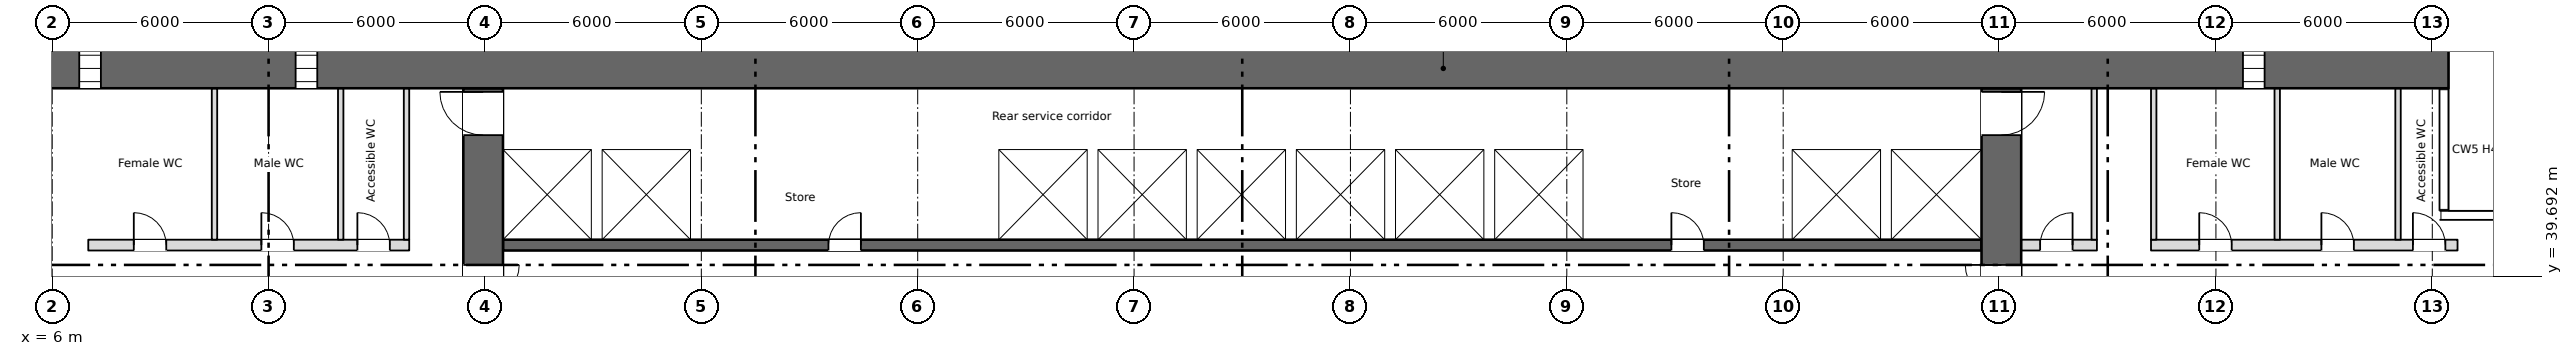
"""IFC4 building model, lengths in metres.
Left out: names, types, materials, properties, quantities, classifications, styles, units other than length and angle.
Written with IfcOpenShell. Run it as: python <this file> out.ifc"""

import sys

from ifc_helpers import new_model, si_unit, direction, frame, frame_2d, origin, place, context, subcontext, project, spatial, rectangle, extrude, element, fill, save


model = new_model("IFC4")
c1 = context("Model", 3, precision=1e-05, world=origin(), true_north=direction((0.0, 1.0)))
c2 = subcontext(c1, "Body", "Model", "MODEL_VIEW")
j1 = project(units=[si_unit("LENGTHUNIT", "METRE"), si_unit("PLANEANGLEUNIT", "RADIAN")], contexts=[c1])
p1 = place(None, origin())
s1 = spatial("IfcSite", under=j1, at=p1, CompositionType="ELEMENT")
p2 = place(p1, origin())
s2 = spatial("IfcBuilding", under=s1, at=p2, CompositionType="ELEMENT")
p3 = place(p2, frame((0.0, 0.0, 6.5)))
s3 = spatial("IfcBuildingStorey", under=s2, at=p3, CompositionType="ELEMENT", Elevation=6.5)
p4 = place(p3, frame((5.55, 45.45, 0.0), z_axis=(0.0, 0.0, 1.0), x_axis=(1.0, 0.0, 0.0)))
e1 = element("IfcWall", 1, at=p4, inside=s3, PredefinedType="SHEAR", context=c2, shape_type="SweptSolid", body=[
    extrude(rectangle(XDim=66.9, YDim=1.1, at=frame_2d((33.45, 0.0))), origin(), (0.0, 0.0, 1.0), 4.3),
])
p5 = place(p4, frame((1.2, 0.0, 0.6)))
e2 = element("IfcOpeningElement", 2, at=p5, cuts=e1, PredefinedType="OPENING", context=c2, shape_type="SweptSolid", body=[
    extrude(rectangle(XDim=0.6, YDim=2.7, at=frame_2d((0.3, 1.35))), frame((0.0, 0.56, 0.0), z_axis=(0.0, -1.0, 0.0), x_axis=(1.0, 0.0, 0.0)), (0.0, 0.0, 1.0), 1.12),
])
p6 = place(p4, frame((7.2, 0.0, 0.6)))
e3 = element("IfcOpeningElement", 3, at=p6, cuts=e1, PredefinedType="OPENING", context=c2, shape_type="SweptSolid", body=[
    extrude(rectangle(XDim=0.6, YDim=2.7, at=frame_2d((0.3, 1.35))), frame((0.0, 0.56, 0.0), z_axis=(0.0, -1.0, 0.0), x_axis=(1.0, 0.0, 0.0)), (0.0, 0.0, 1.0), 1.12),
])
p7 = place(p4, frame((61.2, 0.0, 0.6)))
e4 = element("IfcOpeningElement", 4, at=p7, cuts=e1, PredefinedType="OPENING", context=c2, shape_type="SweptSolid", body=[
    extrude(rectangle(XDim=0.6, YDim=2.7, at=frame_2d((0.3, 1.35))), frame((0.0, 0.56, 0.0), z_axis=(0.0, -1.0, 0.0), x_axis=(1.0, 0.0, 0.0)), (0.0, 0.0, 1.0), 1.12),
])
p8 = place(p3, frame((6.85, 28.4, 0.0), z_axis=(0.0, 0.0, 1.0), x_axis=(0.0, 1.0, 0.0)))
e5 = element("IfcWall", 5, at=p8, inside=s3, PredefinedType="SHEAR", context=c2, shape_type="SweptSolid", body=[
    extrude(rectangle(XDim=16.5, YDim=0.3, at=frame_2d((8.25, 0.0))), origin(), (0.0, 0.0, 1.0), 4.3),
])
p9 = place(p3, frame((72.85, 28.4, 0.0), z_axis=(0.0, 0.0, 1.0), x_axis=(0.0, 1.0, 0.0)))
e6 = element("IfcWall", 6, at=p9, inside=s3, PredefinedType="SHEAR", context=c2, shape_type="SweptSolid", body=[
    extrude(rectangle(XDim=12.85, YDim=0.3, at=frame_2d((6.425, 0.0))), origin(), (0.0, 0.0, 1.0), 4.3),
])
p10 = place(p3, frame((17.95, 28.4, 0.0), z_axis=(0.0, 0.0, 1.0), x_axis=(0.0, 1.0, 0.0)))
e7 = element("IfcWall", 7, at=p10, inside=s3, PredefinedType="SHEAR", context=c2, shape_type="SweptSolid", body=[
    extrude(rectangle(XDim=16.5, YDim=1.1, at=frame_2d((8.25, 0.0))), origin(), (0.0, 0.0, 1.0), 4.3),
])
p11 = place(p10, frame((9.6, 0.0, 0.0)))
e8 = element("IfcOpeningElement", 8, at=p11, cuts=e7, PredefinedType="OPENING", context=c2, shape_type="SweptSolid", body=[
    extrude(rectangle(XDim=2.0, YDim=2.1, at=frame_2d((1.0, 1.05))), frame((0.0, 0.56, 0.0), z_axis=(0.0, -1.0, 0.0), x_axis=(1.0, 0.0, 0.0)), (0.0, 0.0, 1.0), 1.12),
])
p12 = place(p10, frame((15.2, 0.0, 0.0)))
e9 = element("IfcOpeningElement", 9, at=p12, cuts=e7, PredefinedType="OPENING", context=c2, shape_type="SweptSolid", body=[
    extrude(rectangle(XDim=1.2, YDim=2.1, at=frame_2d((0.6, 1.05))), frame((0.0, 0.56, 0.0), z_axis=(0.0, -1.0, 0.0), x_axis=(1.0, 0.0, 0.0)), (0.0, 0.0, 1.0), 1.12),
])
p13 = place(p3, frame((60.05, 28.4, 0.0), z_axis=(0.0, 0.0, 1.0), x_axis=(0.0, 1.0, 0.0)))
e10 = element("IfcWall", 10, at=p13, inside=s3, PredefinedType="SHEAR", context=c2, shape_type="SweptSolid", body=[
    extrude(rectangle(XDim=16.5, YDim=1.1, at=frame_2d((8.25, 0.0))), origin(), (0.0, 0.0, 1.0), 4.3),
])
p14 = place(p13, frame((9.6, 0.0, 0.0)))
e11 = element("IfcOpeningElement", 11, at=p14, cuts=e10, PredefinedType="OPENING", context=c2, shape_type="SweptSolid", body=[
    extrude(rectangle(XDim=2.0, YDim=2.1, at=frame_2d((1.0, 1.05))), frame((0.0, 0.56, 0.0), z_axis=(0.0, -1.0, 0.0), x_axis=(1.0, 0.0, 0.0)), (0.0, 0.0, 1.0), 1.12),
])
p15 = place(p13, frame((15.2, 0.0, 0.0)))
e12 = element("IfcOpeningElement", 12, at=p15, cuts=e10, PredefinedType="OPENING", context=c2, shape_type="SweptSolid", body=[
    extrude(rectangle(XDim=1.2, YDim=2.1, at=frame_2d((0.6, 1.05))), frame((0.0, 0.56, 0.0), z_axis=(0.0, -1.0, 0.0), x_axis=(1.0, 0.0, 0.0)), (0.0, 0.0, 1.0), 1.12),
])
p16 = place(p3, frame((18.5, 40.55, 0.0), z_axis=(0.0, 0.0, 1.0), x_axis=(1.0, 0.0, 0.0)))
e13 = element("IfcWall", 13, at=p16, inside=s3, PredefinedType="SHEAR", context=c2, shape_type="SweptSolid", body=[
    extrude(rectangle(XDim=41.0, YDim=0.3, at=frame_2d((20.5, 0.0))), origin(), (0.0, 0.0, 1.0), 4.3),
])
p17 = place(p16, frame((9.025, 0.0, 0.0)))
e14 = element("IfcOpeningElement", 14, at=p17, cuts=e13, PredefinedType="OPENING", context=c2, shape_type="SweptSolid", body=[
    extrude(rectangle(XDim=0.9, YDim=2.1, at=frame_2d((0.45, 1.05))), frame((0.0, 0.16, 0.0), z_axis=(0.0, -1.0, 0.0), x_axis=(1.0, 0.0, 0.0)), (0.0, 0.0, 1.0), 0.32),
])
p18 = place(p16, frame((32.4, 0.0, 0.0)))
e15 = element("IfcOpeningElement", 15, at=p18, cuts=e13, PredefinedType="OPENING", context=c2, shape_type="SweptSolid", body=[
    extrude(rectangle(XDim=0.9, YDim=2.1, at=frame_2d((0.45, 1.05))), frame((0.0, 0.16, 0.0), z_axis=(0.0, -1.0, 0.0), x_axis=(1.0, 0.0, 0.0)), (0.0, 0.0, 1.0), 0.32),
])
p19 = place(p16, frame((14.425, 0.0, 0.0)))
e16 = element("IfcOpeningElement", 16, at=p19, cuts=e13, PredefinedType="OPENING", context=c2, shape_type="SweptSolid", body=[
    extrude(rectangle(XDim=1.1, YDim=2.1, at=frame_2d((0.55, 1.05))), frame((0.0, 0.16, 0.0), z_axis=(0.0, -1.0, 0.0), x_axis=(1.0, 0.0, 0.0)), (0.0, 0.0, 1.0), 0.32),
])
p20 = place(p16, frame((17.175, 0.0, 0.0)))
e17 = element("IfcOpeningElement", 17, at=p20, cuts=e13, PredefinedType="OPENING", context=c2, shape_type="SweptSolid", body=[
    extrude(rectangle(XDim=1.1, YDim=2.1, at=frame_2d((0.55, 1.05))), frame((0.0, 0.16, 0.0), z_axis=(0.0, -1.0, 0.0), x_axis=(1.0, 0.0, 0.0)), (0.0, 0.0, 1.0), 0.32),
])
p21 = place(p16, frame((19.925, 0.0, 0.0)))
e18 = element("IfcOpeningElement", 18, at=p21, cuts=e13, PredefinedType="OPENING", context=c2, shape_type="SweptSolid", body=[
    extrude(rectangle(XDim=1.1, YDim=2.1, at=frame_2d((0.55, 1.05))), frame((0.0, 0.16, 0.0), z_axis=(0.0, -1.0, 0.0), x_axis=(1.0, 0.0, 0.0)), (0.0, 0.0, 1.0), 0.32),
])
p22 = place(p16, frame((22.675, 0.0, 0.0)))
e19 = element("IfcOpeningElement", 19, at=p22, cuts=e13, PredefinedType="OPENING", context=c2, shape_type="SweptSolid", body=[
    extrude(rectangle(XDim=1.1, YDim=2.1, at=frame_2d((0.55, 1.05))), frame((0.0, 0.16, 0.0), z_axis=(0.0, -1.0, 0.0), x_axis=(1.0, 0.0, 0.0)), (0.0, 0.0, 1.0), 0.32),
])
p23 = place(p16, frame((36.375, 0.0, 0.0)))
e20 = element("IfcOpeningElement", 20, at=p23, cuts=e13, PredefinedType="OPENING", context=c2, shape_type="SweptSolid", body=[
    extrude(rectangle(XDim=1.2, YDim=2.1, at=frame_2d((0.6, 1.05))), frame((0.0, 0.16, 0.0), z_axis=(0.0, -1.0, 0.0), x_axis=(1.0, 0.0, 0.0)), (0.0, 0.0, 1.0), 0.32),
])
p24 = place(p16, frame((39.15, 0.0, 0.0)))
e21 = element("IfcOpeningElement", 21, at=p24, cuts=e13, PredefinedType="OPENING", context=c2, shape_type="SweptSolid", body=[
    extrude(rectangle(XDim=1.2, YDim=2.1, at=frame_2d((0.6, 1.05))), frame((0.0, 0.16, 0.0), z_axis=(0.0, -1.0, 0.0), x_axis=(1.0, 0.0, 0.0)), (0.0, 0.0, 1.0), 0.32),
])
p25 = place(p3, frame((18.5, 43.35, 0.0), z_axis=(0.0, 0.0, 1.0), x_axis=(1.0, 0.0, 0.0)))
e22 = element("IfcWall", 22, at=p25, inside=s3, PredefinedType="SHEAR", context=c2, shape_type="SweptSolid", body=[
    extrude(rectangle(XDim=41.0, YDim=0.3, at=frame_2d((20.5, 0.0))), origin(), (0.0, 0.0, 1.0), 4.3),
])
p26 = place(p3, frame((7.0, 40.55, 0.0), z_axis=(0.0, 0.0, 1.0), x_axis=(1.0, 0.0, 0.0)))
e23 = element("IfcWall", 23, at=p26, inside=s3, PredefinedType="PARTITIONING", context=c2, shape_type="SweptSolid", body=[
    extrude(rectangle(XDim=8.9, YDim=0.3, at=frame_2d((4.45, 0.0))), origin(), (0.0, 0.0, 1.0), 4.3),
])
p27 = place(p26, frame((1.262, 0.0, 0.0)))
e24 = element("IfcOpeningElement", 24, at=p27, cuts=e23, PredefinedType="OPENING", context=c2, shape_type="SweptSolid", body=[
    extrude(rectangle(XDim=0.9, YDim=2.1, at=frame_2d((0.45, 1.05))), frame((0.0, 0.16, 0.0), z_axis=(0.0, -1.0, 0.0), x_axis=(1.0, 0.0, 0.0)), (0.0, 0.0, 1.0), 0.32),
])
p28 = place(p26, frame((4.8, 0.0, 0.0)))
e25 = element("IfcOpeningElement", 25, at=p28, cuts=e23, PredefinedType="OPENING", context=c2, shape_type="SweptSolid", body=[
    extrude(rectangle(XDim=0.9, YDim=2.1, at=frame_2d((0.45, 1.05))), frame((0.0, 0.16, 0.0), z_axis=(0.0, -1.0, 0.0), x_axis=(1.0, 0.0, 0.0)), (0.0, 0.0, 1.0), 0.32),
])
p29 = place(p26, frame((7.462, 0.0, 0.0)))
e26 = element("IfcOpeningElement", 26, at=p29, cuts=e23, PredefinedType="OPENING", context=c2, shape_type="SweptSolid", body=[
    extrude(rectangle(XDim=0.9, YDim=2.1, at=frame_2d((0.45, 1.05))), frame((0.0, 0.16, 0.0), z_axis=(0.0, -1.0, 0.0), x_axis=(1.0, 0.0, 0.0)), (0.0, 0.0, 1.0), 0.32),
])
p30 = place(p3, frame((60.6, 40.55, 0.0), z_axis=(0.0, 0.0, 1.0), x_axis=(1.0, 0.0, 0.0)))
e27 = element("IfcWall", 27, at=p30, inside=s3, PredefinedType="PARTITIONING", context=c2, shape_type="SweptSolid", body=[
    extrude(rectangle(XDim=2.1, YDim=0.3, at=frame_2d((1.05, 0.0))), origin(), (0.0, 0.0, 1.0), 4.3),
])
p31 = place(p30, frame((0.525, 0.0, 0.0)))
e28 = element("IfcOpeningElement", 28, at=p31, cuts=e27, PredefinedType="OPENING", context=c2, shape_type="SweptSolid", body=[
    extrude(rectangle(XDim=0.9, YDim=2.1, at=frame_2d((0.45, 1.05))), frame((0.0, 0.16, 0.0), z_axis=(0.0, -1.0, 0.0), x_axis=(1.0, 0.0, 0.0)), (0.0, 0.0, 1.0), 0.32),
])
p32 = place(p3, frame((64.2, 40.55, 0.0), z_axis=(0.0, 0.0, 1.0), x_axis=(1.0, 0.0, 0.0)))
e29 = element("IfcWall", 29, at=p32, inside=s3, PredefinedType="PARTITIONING", context=c2, shape_type="SweptSolid", body=[
    extrude(rectangle(XDim=8.5, YDim=0.3, at=frame_2d((4.25, 0.0))), origin(), (0.0, 0.0, 1.0), 4.3),
])
p33 = place(p32, frame((1.337, 0.0, 0.0)))
e30 = element("IfcOpeningElement", 30, at=p33, cuts=e29, PredefinedType="OPENING", context=c2, shape_type="SweptSolid", body=[
    extrude(rectangle(XDim=0.9, YDim=2.1, at=frame_2d((0.45, 1.05))), frame((0.0, 0.16, 0.0), z_axis=(0.0, -1.0, 0.0), x_axis=(1.0, 0.0, 0.0)), (0.0, 0.0, 1.0), 0.32),
])
p34 = place(p32, frame((4.725, 0.0, 0.0)))
e31 = element("IfcOpeningElement", 31, at=p34, cuts=e29, PredefinedType="OPENING", context=c2, shape_type="SweptSolid", body=[
    extrude(rectangle(XDim=0.9, YDim=2.1, at=frame_2d((0.45, 1.05))), frame((0.0, 0.16, 0.0), z_axis=(0.0, -1.0, 0.0), x_axis=(1.0, 0.0, 0.0)), (0.0, 0.0, 1.0), 0.32),
])
p35 = place(p32, frame((7.262, 0.0, 0.0)))
e32 = element("IfcOpeningElement", 32, at=p35, cuts=e29, PredefinedType="OPENING", context=c2, shape_type="SweptSolid", body=[
    extrude(rectangle(XDim=0.9, YDim=2.1, at=frame_2d((0.45, 1.05))), frame((0.0, 0.16, 0.0), z_axis=(0.0, -1.0, 0.0), x_axis=(1.0, 0.0, 0.0)), (0.0, 0.0, 1.0), 0.32),
])
for number, where, z_axis, x_axis in (
    (33, (21.1, 40.7, 0.0), (0.0, 0.0, 1.0), (0.0, 1.0, 0.0)),
    (34, (23.85, 40.7, 0.0), (0.0, 0.0, 1.0), (0.0, 1.0, 0.0)),
    (35, (32.1, 40.7, 0.0), (0.0, 0.0, 1.0), (0.0, 1.0, 0.0)),
    (36, (34.85, 40.7, 0.0), (0.0, 0.0, 1.0), (0.0, 1.0, 0.0)),
    (37, (37.6, 40.7, 0.0), (0.0, 0.0, 1.0), (0.0, 1.0, 0.0)),
    (38, (40.35, 40.7, 0.0), (0.0, 0.0, 1.0), (0.0, 1.0, 0.0)),
    (39, (43.1, 40.7, 0.0), (0.0, 0.0, 1.0), (0.0, 1.0, 0.0)),
    (40, (45.85, 40.7, 0.0), (0.0, 0.0, 1.0), (0.0, 1.0, 0.0)),
    (41, (48.6, 40.7, 0.0), (0.0, 0.0, 1.0), (0.0, 1.0, 0.0)),
    (42, (54.1, 40.7, 0.0), (0.0, 0.0, 1.0), (0.0, 1.0, 0.0)),
    (43, (56.85, 40.7, 0.0), (0.0, 0.0, 1.0), (0.0, 1.0, 0.0)),
):
    element("IfcWall", number, at=place(p3, frame(where, z_axis=z_axis, x_axis=x_axis)), inside=s3, PredefinedType="SHEAR", context=c2, shape_type="SweptSolid", body=[
        extrude(rectangle(XDim=2.5, YDim=0.3, at=frame_2d((1.25, 0.0))), origin(), (0.0, 0.0, 1.0), 4.3),
    ])
for number, where, z_axis, x_axis in (
    (44, (15.825, 40.7, 0.0), (0.0, 0.0, 1.0), (0.0, 1.0, 0.0)),
    (45, (62.625, 40.7, 0.0), (0.0, 0.0, 1.0), (0.0, 1.0, 0.0)),
    (46, (64.275, 40.7, 0.0), (0.0, 0.0, 1.0), (0.0, 1.0, 0.0)),
    (47, (10.5, 40.7, 0.0), (0.0, 0.0, 1.0), (0.0, 1.0, 0.0)),
    (48, (14.0, 40.7, 0.0), (0.0, 0.0, 1.0), (0.0, 1.0, 0.0)),
    (49, (67.7, 40.7, 0.0), (0.0, 0.0, 1.0), (0.0, 1.0, 0.0)),
    (50, (71.05, 40.7, 0.0), (0.0, 0.0, 1.0), (0.0, 1.0, 0.0)),
):
    element("IfcWall", number, at=place(p3, frame(where, z_axis=z_axis, x_axis=x_axis)), inside=s3, PredefinedType="PARTITIONING", context=c2, shape_type="SweptSolid", body=[
        extrude(rectangle(XDim=4.2, YDim=0.15, at=frame_2d((2.1, 0.0))), origin(), (0.0, 0.0, 1.0), 4.3),
    ])
p36 = place(p5, origin())
e51 = element("IfcWindow", 51, at=p36, inside=s3, PartitioningType="SINGLE_PANEL", PredefinedType="WINDOW", context=c2, shape_type="SweptSolid", body=[
    extrude(rectangle(XDim=0.6, YDim=2.7, at=frame_2d((0.3, 1.35))), frame((0.0, 0.03, 0.0), z_axis=(0.0, -1.0, 0.0), x_axis=(1.0, 0.0, 0.0)), (0.0, 0.0, 1.0), 0.06),
])
fill(e2, e51)
p37 = place(p6, origin())
e52 = element("IfcWindow", 52, at=p37, inside=s3, PartitioningType="SINGLE_PANEL", PredefinedType="WINDOW", context=c2, shape_type="SweptSolid", body=[
    extrude(rectangle(XDim=0.6, YDim=2.7, at=frame_2d((0.3, 1.35))), frame((0.0, 0.03, 0.0), z_axis=(0.0, -1.0, 0.0), x_axis=(1.0, 0.0, 0.0)), (0.0, 0.0, 1.0), 0.06),
])
fill(e3, e52)
p38 = place(p7, origin())
e53 = element("IfcWindow", 53, at=p38, inside=s3, PartitioningType="SINGLE_PANEL", PredefinedType="WINDOW", context=c2, shape_type="SweptSolid", body=[
    extrude(rectangle(XDim=0.6, YDim=2.7, at=frame_2d((0.3, 1.35))), frame((0.0, 0.03, 0.0), z_axis=(0.0, -1.0, 0.0), x_axis=(1.0, 0.0, 0.0)), (0.0, 0.0, 1.0), 0.06),
])
fill(e4, e53)
p39 = place(p27, origin())
e54 = element("IfcDoor", 54, at=p39, inside=s3, OperationType="SINGLE_SWING_LEFT", PredefinedType="DOOR", context=c2, shape_type="SweptSolid", body=[
    extrude(rectangle(XDim=0.9, YDim=2.1, at=frame_2d((0.45, 1.05))), frame((0.0, 0.025, 0.0), z_axis=(0.0, -1.0, 0.0), x_axis=(1.0, 0.0, 0.0)), (0.0, 0.0, 1.0), 0.05),
])
fill(e24, e54)
p40 = place(p28, origin())
e55 = element("IfcDoor", 55, at=p40, inside=s3, OperationType="SINGLE_SWING_LEFT", PredefinedType="DOOR", context=c2, shape_type="SweptSolid", body=[
    extrude(rectangle(XDim=0.9, YDim=2.1, at=frame_2d((0.45, 1.05))), frame((0.0, 0.025, 0.0), z_axis=(0.0, -1.0, 0.0), x_axis=(1.0, 0.0, 0.0)), (0.0, 0.0, 1.0), 0.05),
])
fill(e25, e55)
p41 = place(p29, origin())
e56 = element("IfcDoor", 56, at=p41, inside=s3, OperationType="SINGLE_SWING_LEFT", PredefinedType="DOOR", context=c2, shape_type="SweptSolid", body=[
    extrude(rectangle(XDim=0.9, YDim=2.1, at=frame_2d((0.45, 1.05))), frame((0.0, 0.025, 0.0), z_axis=(0.0, -1.0, 0.0), x_axis=(1.0, 0.0, 0.0)), (0.0, 0.0, 1.0), 0.05),
])
fill(e26, e56)
p42 = place(p31, origin())
e57 = element("IfcDoor", 57, at=p42, inside=s3, OperationType="SINGLE_SWING_RIGHT", PredefinedType="DOOR", context=c2, shape_type="SweptSolid", body=[
    extrude(rectangle(XDim=0.9, YDim=2.1, at=frame_2d((0.45, 1.05))), frame((0.0, 0.025, 0.0), z_axis=(0.0, -1.0, 0.0), x_axis=(1.0, 0.0, 0.0)), (0.0, 0.0, 1.0), 0.05),
])
fill(e28, e57)
p43 = place(p33, origin())
e58 = element("IfcDoor", 58, at=p43, inside=s3, OperationType="SINGLE_SWING_LEFT", PredefinedType="DOOR", context=c2, shape_type="SweptSolid", body=[
    extrude(rectangle(XDim=0.9, YDim=2.1, at=frame_2d((0.45, 1.05))), frame((0.0, 0.025, 0.0), z_axis=(0.0, -1.0, 0.0), x_axis=(1.0, 0.0, 0.0)), (0.0, 0.0, 1.0), 0.05),
])
fill(e30, e58)
p44 = place(p34, origin())
e59 = element("IfcDoor", 59, at=p44, inside=s3, OperationType="SINGLE_SWING_LEFT", PredefinedType="DOOR", context=c2, shape_type="SweptSolid", body=[
    extrude(rectangle(XDim=0.9, YDim=2.1, at=frame_2d((0.45, 1.05))), frame((0.0, 0.025, 0.0), z_axis=(0.0, -1.0, 0.0), x_axis=(1.0, 0.0, 0.0)), (0.0, 0.0, 1.0), 0.05),
])
fill(e31, e59)
p45 = place(p35, origin())
e60 = element("IfcDoor", 60, at=p45, inside=s3, OperationType="SINGLE_SWING_LEFT", PredefinedType="DOOR", context=c2, shape_type="SweptSolid", body=[
    extrude(rectangle(XDim=0.9, YDim=2.1, at=frame_2d((0.45, 1.05))), frame((0.0, 0.025, 0.0), z_axis=(0.0, -1.0, 0.0), x_axis=(1.0, 0.0, 0.0)), (0.0, 0.0, 1.0), 0.05),
])
fill(e32, e60)
p46 = place(p17, origin())
e61 = element("IfcDoor", 61, at=p46, inside=s3, OperationType="SINGLE_SWING_RIGHT", PredefinedType="DOOR", context=c2, shape_type="SweptSolid", body=[
    extrude(rectangle(XDim=0.9, YDim=2.1, at=frame_2d((0.45, 1.05))), frame((0.0, 0.025, 0.0), z_axis=(0.0, -1.0, 0.0), x_axis=(1.0, 0.0, 0.0)), (0.0, 0.0, 1.0), 0.05),
])
fill(e14, e61)
p47 = place(p18, origin())
e62 = element("IfcDoor", 62, at=p47, inside=s3, OperationType="SINGLE_SWING_LEFT", PredefinedType="DOOR", context=c2, shape_type="SweptSolid", body=[
    extrude(rectangle(XDim=0.9, YDim=2.1, at=frame_2d((0.45, 1.05))), frame((0.0, 0.025, 0.0), z_axis=(0.0, -1.0, 0.0), x_axis=(1.0, 0.0, 0.0)), (0.0, 0.0, 1.0), 0.05),
])
fill(e15, e62)
p48 = place(p19, origin())
e63 = element("IfcDoor", 63, at=p48, inside=s3, OperationType="SLIDING_TO_LEFT", PredefinedType="DOOR", context=c2, shape_type="SweptSolid", body=[
    extrude(rectangle(XDim=1.1, YDim=2.1, at=frame_2d((0.55, 1.05))), frame((0.0, 0.025, 0.0), z_axis=(0.0, -1.0, 0.0), x_axis=(1.0, 0.0, 0.0)), (0.0, 0.0, 1.0), 0.05),
])
fill(e16, e63)
p49 = place(p20, origin())
e64 = element("IfcDoor", 64, at=p49, inside=s3, OperationType="SLIDING_TO_LEFT", PredefinedType="DOOR", context=c2, shape_type="SweptSolid", body=[
    extrude(rectangle(XDim=1.1, YDim=2.1, at=frame_2d((0.55, 1.05))), frame((0.0, 0.025, 0.0), z_axis=(0.0, -1.0, 0.0), x_axis=(1.0, 0.0, 0.0)), (0.0, 0.0, 1.0), 0.05),
])
fill(e17, e64)
p50 = place(p21, origin())
e65 = element("IfcDoor", 65, at=p50, inside=s3, OperationType="SLIDING_TO_LEFT", PredefinedType="DOOR", context=c2, shape_type="SweptSolid", body=[
    extrude(rectangle(XDim=1.1, YDim=2.1, at=frame_2d((0.55, 1.05))), frame((0.0, 0.025, 0.0), z_axis=(0.0, -1.0, 0.0), x_axis=(1.0, 0.0, 0.0)), (0.0, 0.0, 1.0), 0.05),
])
fill(e18, e65)
p51 = place(p22, origin())
e66 = element("IfcDoor", 66, at=p51, inside=s3, OperationType="SLIDING_TO_LEFT", PredefinedType="DOOR", context=c2, shape_type="SweptSolid", body=[
    extrude(rectangle(XDim=1.1, YDim=2.1, at=frame_2d((0.55, 1.05))), frame((0.0, 0.025, 0.0), z_axis=(0.0, -1.0, 0.0), x_axis=(1.0, 0.0, 0.0)), (0.0, 0.0, 1.0), 0.05),
])
fill(e19, e66)
p52 = place(p23, origin())
e67 = element("IfcDoor", 67, at=p52, inside=s3, OperationType="SLIDING_TO_LEFT", PredefinedType="DOOR", context=c2, shape_type="SweptSolid", body=[
    extrude(rectangle(XDim=1.2, YDim=2.1, at=frame_2d((0.6, 1.05))), frame((0.0, 0.025, 0.0), z_axis=(0.0, -1.0, 0.0), x_axis=(1.0, 0.0, 0.0)), (0.0, 0.0, 1.0), 0.05),
])
fill(e20, e67)
p53 = place(p24, origin())
e68 = element("IfcDoor", 68, at=p53, inside=s3, OperationType="SLIDING_TO_LEFT", PredefinedType="DOOR", context=c2, shape_type="SweptSolid", body=[
    extrude(rectangle(XDim=1.2, YDim=2.1, at=frame_2d((0.6, 1.05))), frame((0.0, 0.025, 0.0), z_axis=(0.0, -1.0, 0.0), x_axis=(1.0, 0.0, 0.0)), (0.0, 0.0, 1.0), 0.05),
])
fill(e21, e68)
p54 = place(p11, origin())
e69 = element("IfcDoor", 69, at=p54, inside=s3, OperationType="DOUBLE_DOOR_SINGLE_SWING", PredefinedType="DOOR", context=c2, shape_type="SweptSolid", body=[
    extrude(rectangle(XDim=2.0, YDim=2.1, at=frame_2d((1.0, 1.05))), frame((0.0, 0.025, 0.0), z_axis=(0.0, -1.0, 0.0), x_axis=(1.0, 0.0, 0.0)), (0.0, 0.0, 1.0), 0.05),
])
fill(e8, e69)
p55 = place(p14, origin())
e70 = element("IfcDoor", 70, at=p55, inside=s3, OperationType="DOUBLE_DOOR_SINGLE_SWING", PredefinedType="DOOR", context=c2, shape_type="SweptSolid", body=[
    extrude(rectangle(XDim=2.0, YDim=2.1, at=frame_2d((1.0, 1.05))), frame((0.0, 0.025, 0.0), z_axis=(0.0, -1.0, 0.0), x_axis=(1.0, 0.0, 0.0)), (0.0, 0.0, 1.0), 0.05),
])
fill(e11, e70)
p56 = place(p12, origin())
e71 = element("IfcDoor", 71, at=p56, inside=s3, OperationType="SINGLE_SWING_RIGHT", PredefinedType="DOOR", context=c2, shape_type="SweptSolid", body=[
    extrude(rectangle(XDim=1.2, YDim=2.1, at=frame_2d((0.6, 1.05))), frame((0.0, 0.025, 0.0), z_axis=(0.0, -1.0, 0.0), x_axis=(1.0, 0.0, 0.0)), (0.0, 0.0, 1.0), 0.05),
])
fill(e9, e71)
p57 = place(p15, origin())
e72 = element("IfcDoor", 72, at=p57, inside=s3, OperationType="SINGLE_SWING_RIGHT", PredefinedType="DOOR", context=c2, shape_type="SweptSolid", body=[
    extrude(rectangle(XDim=1.2, YDim=2.1, at=frame_2d((0.6, 1.05))), frame((0.0, 0.025, 0.0), z_axis=(0.0, -1.0, 0.0), x_axis=(1.0, 0.0, 0.0)), (0.0, 0.0, 1.0), 0.05),
])
fill(e12, e72)
save(model, sys.argv[1])
